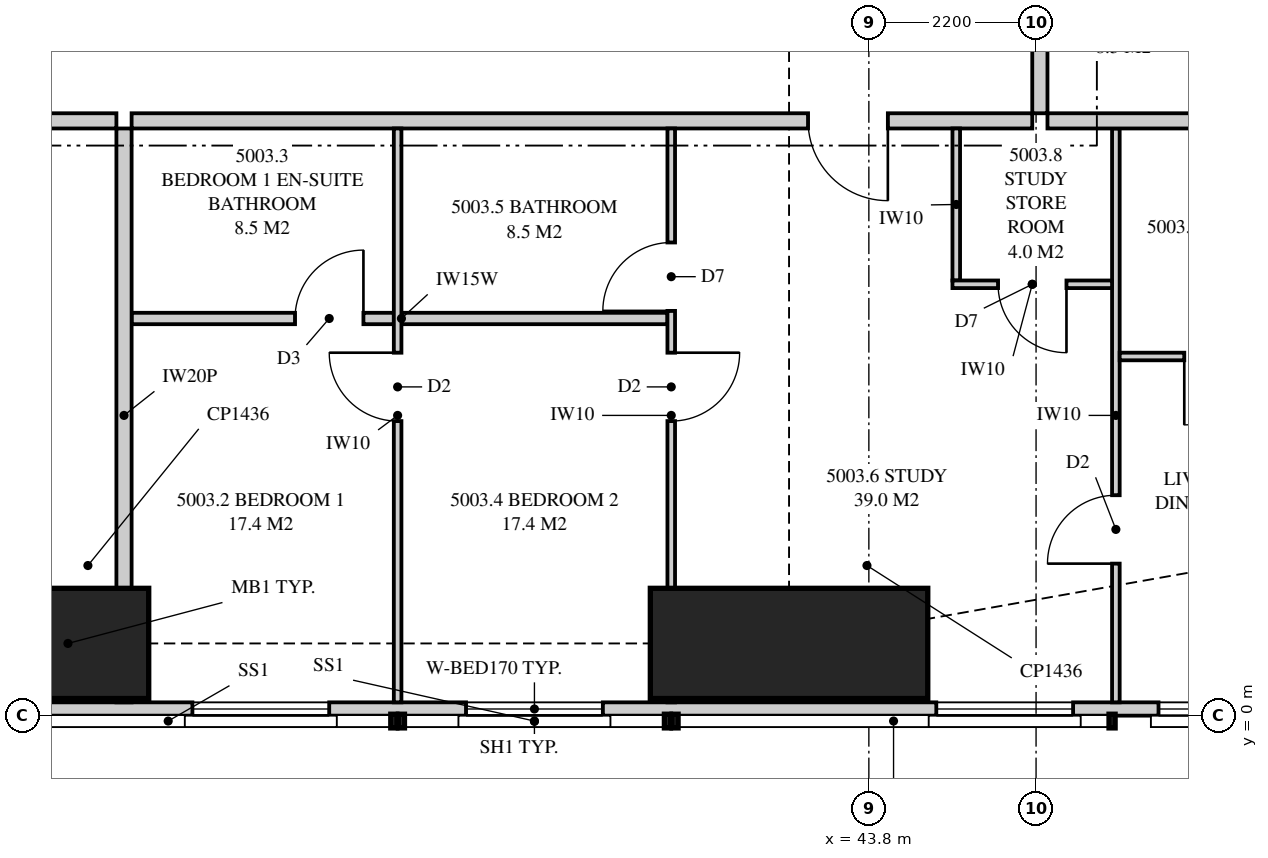
"""IFC4 building model, lengths in metres.
Left out: names, types, materials, properties, quantities, classifications, styles, units other than length and angle.
Written with IfcOpenShell. Run it as: python <this file> out.ifc"""

import sys

from ifc_helpers import new_model, si_unit, direction, frame, frame_2d, origin, origin_2d, place, context, subcontext, project, spatial, polyline, rectangle, outline, extrude, element, fill, save


model = new_model("IFC4")
c1 = context("Model", 3, precision=1e-05, world=origin(), true_north=direction((0.0, 1.0)))
c2 = subcontext(c1, "Body", "Model", "MODEL_VIEW")
j1 = project(units=[si_unit("LENGTHUNIT", "METRE"), si_unit("PLANEANGLEUNIT", "RADIAN")], contexts=[c1])
p1 = place(None, origin())
s1 = spatial("IfcSite", under=j1, at=p1, CompositionType="ELEMENT")
p2 = place(p1, origin())
s2 = spatial("IfcBuilding", under=s1, at=p2, CompositionType="ELEMENT")
p3 = place(p2, frame((0.0, 0.0, 184.5)))
s3 = spatial("IfcBuildingStorey", under=s2, at=p3, CompositionType="ELEMENT", Elevation=184.5)
for number, where, z_axis, x_axis in (
    (1, (32.5, 0.95, 0.0), (0.0, 0.0, 1.0), (0.0, 1.0, 0.0)),
    (2, (42.75, 0.95, 0.0), (0.0, 0.0, 1.0), (0.0, 1.0, 0.0)),
):
    element("IfcColumn", number, at=place(p3, frame(where, z_axis=z_axis, x_axis=x_axis)), inside=s3, PredefinedType="COLUMN", context=c2, shape_type="SweptSolid", body=[
        extrude(rectangle(XDim=1.45, YDim=3.65, at=origin_2d()), origin(), (0.0, 0.0, 1.0), 3.35),
    ])
p4 = place(p3, frame((15.051, 0.087, 0.0), z_axis=(0.0, 0.0, 1.0), x_axis=(1.0, 0.0, 0.0)))
e3 = element("IfcWall", 3, at=p4, inside=s3, PredefinedType="SOLIDWALL", context=c2, shape_type="SweptSolid", body=[
    extrude(outline(polyline([(0.0, 0.0), (34.897, 0.0), (34.897, 3.11), (27.91, 3.11), (27.91, 2.15), (27.836, 2.15), (27.836, 3.11), (27.699, 3.11), (27.699, 2.15), (7.199, 2.15), (7.199, 3.11), (7.062, 3.11), (7.062, 2.15), (6.987, 2.15), (6.987, 3.11), (0.0, 3.11), (0.0, 0.0)])), frame((0.0, 0.087, 0.0), z_axis=(0.0, -1.0, 0.0), x_axis=(1.0, 0.0, 0.0)), (0.0, 0.0, 1.0), 0.175),
])
p5 = place(p4, frame((2.84, 0.0, 0.4)))
e4 = element("IfcOpeningElement", 4, at=p5, cuts=e3, PredefinedType="OPENING", context=c2, shape_type="SweptSolid", body=[
    extrude(rectangle(XDim=2.4, YDim=1.7, at=frame_2d((1.2, 0.85))), frame((0.0, 0.097, 0.0), z_axis=(0.0, -1.0, 0.0), x_axis=(1.0, 0.0, 0.0)), (0.0, 0.0, 1.0), 0.195),
])
p6 = place(p4, frame((9.149, 0.0, 0.4)))
e5 = element("IfcOpeningElement", 5, at=p6, cuts=e3, PredefinedType="OPENING", context=c2, shape_type="SweptSolid", body=[
    extrude(rectangle(XDim=1.8, YDim=1.7, at=frame_2d((0.9, 0.85))), frame((0.0, 0.097, 0.0), z_axis=(0.0, -1.0, 0.0), x_axis=(1.0, 0.0, 0.0)), (0.0, 0.0, 1.0), 0.195),
])
p7 = place(p4, frame((13.561, 0.0, 0.0)))
e6 = element("IfcOpeningElement", 6, at=p7, cuts=e3, PredefinedType="OPENING", context=c2, shape_type="SweptSolid", body=[
    extrude(rectangle(XDim=1.8, YDim=2.1, at=frame_2d((0.9, 1.05))), frame((0.0, 0.097, 0.0), z_axis=(0.0, -1.0, 0.0), x_axis=(1.0, 0.0, 0.0)), (0.0, 0.0, 1.0), 0.195),
])
p8 = place(p4, frame((19.849, 0.0, 0.4)))
e7 = element("IfcOpeningElement", 7, at=p8, cuts=e3, PredefinedType="OPENING", context=c2, shape_type="SweptSolid", body=[
    extrude(rectangle(XDim=1.8, YDim=1.7, at=frame_2d((0.9, 0.85))), frame((0.0, 0.097, 0.0), z_axis=(0.0, -1.0, 0.0), x_axis=(1.0, 0.0, 0.0)), (0.0, 0.0, 1.0), 0.195),
])
p9 = place(p4, frame((23.449, 0.0, 0.4)))
e8 = element("IfcOpeningElement", 8, at=p9, cuts=e3, PredefinedType="OPENING", context=c2, shape_type="SweptSolid", body=[
    extrude(rectangle(XDim=1.8, YDim=1.7, at=frame_2d((0.9, 0.85))), frame((0.0, 0.097, 0.0), z_axis=(0.0, -1.0, 0.0), x_axis=(1.0, 0.0, 0.0)), (0.0, 0.0, 1.0), 0.195),
])
p10 = place(p4, frame((29.636, 0.0, 0.4)))
e9 = element("IfcOpeningElement", 9, at=p10, cuts=e3, PredefinedType="OPENING", context=c2, shape_type="SweptSolid", body=[
    extrude(rectangle(XDim=1.8, YDim=1.7, at=frame_2d((0.9, 0.85))), frame((0.0, 0.097, 0.0), z_axis=(0.0, -1.0, 0.0), x_axis=(1.0, 0.0, 0.0)), (0.0, 0.0, 1.0), 0.195),
])
p11 = place(p4, frame((32.56, 0.0, 0.4)))
e10 = element("IfcOpeningElement", 10, at=p11, cuts=e3, PredefinedType="OPENING", context=c2, shape_type="SweptSolid", body=[
    extrude(rectangle(XDim=1.8, YDim=1.7, at=frame_2d((0.9, 0.85))), frame((0.0, 0.097, 0.0), z_axis=(0.0, -1.0, 0.0), x_axis=(1.0, 0.0, 0.0)), (0.0, 0.0, 1.0), 0.195),
])
p12 = place(p3, frame((34.0, 0.175, 0.0), z_axis=(0.0, 0.0, 1.0), x_axis=(0.0, 1.0, 0.0)))
e11 = element("IfcWall", 11, at=p12, inside=s3, PredefinedType="PARTITIONING", context=c2, shape_type="SweptSolid", body=[
    extrude(outline(polyline([(0.0, 0.0), (7.55, 0.0), (7.55, 3.11), (1.685, 3.11), (1.685, 2.15), (0.0, 2.15), (0.0, 3.11), (0.0, 0.0)])), frame((0.0, 0.1, 0.0), z_axis=(0.0, -1.0, 0.0), x_axis=(1.0, 0.0, 0.0)), (0.0, 0.0, 1.0), 0.2),
])
p13 = place(p3, frame((34.1, 7.825, 0.0), z_axis=(0.0, 0.0, 1.0), x_axis=(1.0, 0.0, 0.0)))
e12 = element("IfcWall", 12, at=p13, inside=s3, PredefinedType="PARTITIONING", context=c2, shape_type="SweptSolid", body=[
    extrude(outline(polyline([(0.0, 0.0), (11.85, 0.0), (11.85, 3.11), (8.987, 3.11), (8.987, 2.541), (8.312, 2.541), (8.312, 3.11), (0.0, 3.11), (0.0, 0.0)])), frame((0.0, 0.1, 0.0), z_axis=(0.0, -1.0, 0.0), x_axis=(1.0, 0.0, 0.0)), (0.0, 0.0, 1.0), 0.2),
])
p14 = place(p13, frame((8.9, 0.0, 0.0)))
e13 = element("IfcOpeningElement", 13, at=p14, cuts=e12, PredefinedType="OPENING", context=c2, shape_type="SweptSolid", body=[
    extrude(rectangle(XDim=1.05, YDim=2.2, at=frame_2d((0.525, 1.1))), frame((0.0, 0.11, 0.0), z_axis=(0.0, -1.0, 0.0), x_axis=(1.0, 0.0, 0.0)), (0.0, 0.0, 1.0), 0.22),
])
p15 = place(p3, frame((37.6, 0.175, 0.0), z_axis=(0.0, 0.0, 1.0), x_axis=(0.0, 1.0, 0.0)))
e14 = element("IfcWall", 14, at=p15, inside=s3, PredefinedType="PARTITIONING", context=c2, shape_type="SweptSolid", body=[
    extrude(outline(polyline([(0.0, 0.0), (7.55, 0.0), (7.55, 3.11), (1.635, 3.11), (1.635, 2.15), (0.0, 2.15), (0.0, 3.11), (0.0, 0.0)])), frame((0.0, 0.05, 0.0), z_axis=(0.0, -1.0, 0.0), x_axis=(1.0, 0.0, 0.0)), (0.0, 0.0, 1.0), 0.1),
])
p16 = place(p15, frame((3.7, 0.0, 0.0)))
e15 = element("IfcOpeningElement", 15, at=p16, cuts=e14, PredefinedType="OPENING", context=c2, shape_type="SweptSolid", body=[
    extrude(rectangle(XDim=0.9, YDim=2.1, at=frame_2d((0.45, 1.05))), frame((0.0, 0.06, 0.0), z_axis=(0.0, -1.0, 0.0), x_axis=(1.0, 0.0, 0.0)), (0.0, 0.0, 1.0), 0.12),
])
p17 = place(p3, frame((41.2, 0.175, 0.0), z_axis=(0.0, 0.0, 1.0), x_axis=(0.0, 1.0, 0.0)))
e16 = element("IfcWall", 16, at=p17, inside=s3, PredefinedType="PARTITIONING", context=c2, shape_type="SweptSolid", body=[
    extrude(outline(polyline([(0.0, 0.0), (7.55, 0.0), (7.55, 3.11), (1.635, 3.11), (1.635, 2.15), (0.0, 2.15), (0.0, 3.11), (0.0, 0.0)])), frame((0.0, 0.05, 0.0), z_axis=(0.0, -1.0, 0.0), x_axis=(1.0, 0.0, 0.0)), (0.0, 0.0, 1.0), 0.1),
])
p18 = place(p17, frame((3.7, 0.0, 0.0)))
e17 = element("IfcOpeningElement", 17, at=p18, cuts=e16, PredefinedType="OPENING", context=c2, shape_type="SweptSolid", body=[
    extrude(rectangle(XDim=0.9, YDim=2.1, at=frame_2d((0.45, 1.05))), frame((0.0, 0.06, 0.0), z_axis=(0.0, -1.0, 0.0), x_axis=(1.0, 0.0, 0.0)), (0.0, 0.0, 1.0), 0.12),
])
p19 = place(p17, frame((5.15, 0.0, 0.0)))
e18 = element("IfcOpeningElement", 18, at=p19, cuts=e16, PredefinedType="OPENING", context=c2, shape_type="SweptSolid", body=[
    extrude(rectangle(XDim=0.9, YDim=2.1, at=frame_2d((0.45, 1.05))), frame((0.0, 0.06, 0.0), z_axis=(0.0, -1.0, 0.0), x_axis=(1.0, 0.0, 0.0)), (0.0, 0.0, 1.0), 0.12),
])
p20 = place(p3, frame((34.1, 5.225, 0.0), z_axis=(0.0, 0.0, 1.0), x_axis=(1.0, 0.0, 0.0)))
e19 = element("IfcWall", 19, at=p20, inside=s3, PredefinedType="PLUMBINGWALL", context=c2, shape_type="SweptSolid", body=[
    extrude(rectangle(XDim=3.45, YDim=0.15, at=frame_2d((1.725, 0.0))), origin(), (0.0, 0.0, 1.0), 3.11),
])
p21 = place(p20, frame((2.15, 0.0, 0.0)))
e20 = element("IfcOpeningElement", 20, at=p21, cuts=e19, PredefinedType="OPENING", context=c2, shape_type="SweptSolid", body=[
    extrude(rectangle(XDim=0.9, YDim=2.1, at=frame_2d((0.45, 1.05))), frame((0.0, 0.085, 0.0), z_axis=(0.0, -1.0, 0.0), x_axis=(1.0, 0.0, 0.0)), (0.0, 0.0, 1.0), 0.17),
])
p22 = place(p3, frame((37.65, 5.225, 0.0), z_axis=(0.0, 0.0, 1.0), x_axis=(1.0, 0.0, 0.0)))
e21 = element("IfcWall", 21, at=p22, inside=s3, PredefinedType="PLUMBINGWALL", context=c2, shape_type="SweptSolid", body=[
    extrude(rectangle(XDim=3.5, YDim=0.15, at=frame_2d((1.75, 0.0))), origin(), (0.0, 0.0, 1.0), 3.11),
])
p23 = place(p3, frame((47.05, 0.175, 0.0), z_axis=(0.0, 0.0, 1.0), x_axis=(0.0, 1.0, 0.0)))
e22 = element("IfcWall", 22, at=p23, inside=s3, PredefinedType="PARTITIONING", context=c2, shape_type="SweptSolid", body=[
    extrude(outline(polyline([(0.0, 0.0), (7.55, 0.0), (7.55, 3.11), (2.409, 3.11), (2.409, 2.15), (0.663, 2.15), (0.663, 3.11), (0.0, 3.11), (0.0, 0.0)])), frame((0.0, 0.05, 0.0), z_axis=(0.0, -1.0, 0.0), x_axis=(1.0, 0.0, 0.0)), (0.0, 0.0, 1.0), 0.1),
])
p24 = place(p23, frame((1.825, 0.0, 0.0)))
e23 = element("IfcOpeningElement", 23, at=p24, cuts=e22, PredefinedType="OPENING", context=c2, shape_type="SweptSolid", body=[
    extrude(rectangle(XDim=0.9, YDim=2.1, at=frame_2d((0.45, 1.05))), frame((0.0, 0.06, 0.0), z_axis=(0.0, -1.0, 0.0), x_axis=(1.0, 0.0, 0.0)), (0.0, 0.0, 1.0), 0.12),
])
p25 = place(p3, frame((47.1, 4.725, 0.0), z_axis=(0.0, 0.0, 1.0), x_axis=(1.0, 0.0, 0.0)))
e24 = element("IfcWall", 24, at=p25, inside=s3, PredefinedType="PARTITIONING", context=c2, shape_type="SweptSolid", body=[
    extrude(rectangle(XDim=2.6, YDim=0.1, at=frame_2d((1.3, 0.0))), origin(), (0.0, 0.0, 1.0), 3.11),
])
p26 = place(p25, frame((0.85, 0.0, 0.0)))
e25 = element("IfcOpeningElement", 25, at=p26, cuts=e24, PredefinedType="OPENING", context=c2, shape_type="SweptSolid", body=[
    extrude(rectangle(XDim=0.9, YDim=2.1, at=frame_2d((0.45, 1.05))), frame((0.0, 0.06, 0.0), z_axis=(0.0, -1.0, 0.0), x_axis=(1.0, 0.0, 0.0)), (0.0, 0.0, 1.0), 0.12),
])
p27 = place(p3, frame((46.15, 7.825, 0.0), z_axis=(0.0, 0.0, 1.0), x_axis=(1.0, 0.0, 0.0)))
e26 = element("IfcWall", 26, at=p27, inside=s3, PredefinedType="PARTITIONING", context=c2, shape_type="SweptSolid", body=[
    extrude(outline(polyline([(0.0, 0.0), (6.85, 0.0), (6.85, 3.11), (6.138, 3.11), (6.138, 2.15), (4.303, 2.15), (4.303, 3.11), (0.0, 3.11), (0.0, 0.0)])), frame((0.0, 0.1, 0.0), z_axis=(0.0, -1.0, 0.0), x_axis=(1.0, 0.0, 0.0)), (0.0, 0.0, 1.0), 0.2),
])
p28 = place(p3, frame((46.05, 7.925, 0.0), z_axis=(0.0, 0.0, 1.0), x_axis=(0.0, 1.0, 0.0)))
e27 = element("IfcWall", 27, at=p28, inside=s3, PredefinedType="PARTITIONING", context=c2, shape_type="SweptSolid", body=[
    extrude(outline(polyline([(0.0, 0.0), (13.775, 0.0), (13.775, 3.11), (5.412, 3.11), (5.412, 2.541), (4.738, 2.541), (4.738, 3.11), (0.0, 3.11), (0.0, 0.0)])), frame((0.0, 0.1, 0.0), z_axis=(0.0, -1.0, 0.0), x_axis=(1.0, 0.0, 0.0)), (0.0, 0.0, 1.0), 0.2),
])
p29 = place(p28, frame((6.387, 0.0, 0.0)))
e28 = element("IfcOpeningElement", 28, at=p29, cuts=e27, PredefinedType="OPENING", context=c2, shape_type="SweptSolid", body=[
    extrude(rectangle(XDim=1.05, YDim=2.2, at=frame_2d((0.525, 1.1))), frame((0.0, 0.11, 0.0), z_axis=(0.0, -1.0, 0.0), x_axis=(1.0, 0.0, 0.0)), (0.0, 0.0, 1.0), 0.22),
])
p30 = place(p3, frame((30.05, 7.825, 0.0), z_axis=(0.0, 0.0, 1.0), x_axis=(1.0, 0.0, 0.0)))
e29 = element("IfcWall", 29, at=p30, inside=s3, PredefinedType="PARTITIONING", context=c2, shape_type="SweptSolid", body=[
    extrude(outline(polyline([(0.0, 0.0), (3.85, 0.0), (3.85, 3.11), (2.787, 3.11), (2.787, 2.541), (2.113, 2.541), (2.113, 3.11), (0.0, 3.11), (0.0, 0.0)])), frame((0.0, 0.1, 0.0), z_axis=(0.0, -1.0, 0.0), x_axis=(1.0, 0.0, 0.0)), (0.0, 0.0, 1.0), 0.2),
])
p31 = place(p3, frame((47.0, 5.675, 0.0), z_axis=(0.0, 0.0, 1.0), x_axis=(-1.0, 0.0, 0.0)))
e30 = element("IfcWall", 30, at=p31, inside=s3, PredefinedType="PARTITIONING", context=c2, shape_type="SweptSolid", body=[
    extrude(rectangle(XDim=2.1, YDim=0.1, at=frame_2d((1.05, 0.0))), origin(), (0.0, 0.0, 1.0), 3.11),
])
p32 = place(p31, frame((0.6, 0.0, 0.0)))
e31 = element("IfcOpeningElement", 31, at=p32, cuts=e30, PredefinedType="OPENING", context=c2, shape_type="SweptSolid", body=[
    extrude(rectangle(XDim=0.9, YDim=2.1, at=frame_2d((0.45, 1.05))), frame((0.0, 0.06, 0.0), z_axis=(0.0, -1.0, 0.0), x_axis=(1.0, 0.0, 0.0)), (0.0, 0.0, 1.0), 0.12),
])
p33 = place(p3, frame((44.95, 7.725, 0.0), z_axis=(0.0, 0.0, 1.0), x_axis=(0.0, -1.0, 0.0)))
e32 = element("IfcWall", 32, at=p33, inside=s3, PredefinedType="PARTITIONING", context=c2, shape_type="SweptSolid", body=[
    extrude(rectangle(XDim=2.0, YDim=0.1, at=frame_2d((1.0, 0.0))), origin(), (0.0, 0.0, 1.0), 3.11),
])
p34 = place(p8, origin())
e33 = element("IfcWindow", 33, at=p34, inside=s3, PartitioningType="SINGLE_PANEL", PredefinedType="WINDOW", context=c2, shape_type="SweptSolid", body=[
    extrude(rectangle(XDim=1.8, YDim=1.7, at=frame_2d((0.9, 0.85))), frame((0.0, 0.03, 0.0), z_axis=(0.0, -1.0, 0.0), x_axis=(1.0, 0.0, 0.0)), (0.0, 0.0, 1.0), 0.06),
])
fill(e7, e33)
p35 = place(p9, origin())
e34 = element("IfcWindow", 34, at=p35, inside=s3, PartitioningType="SINGLE_PANEL", PredefinedType="WINDOW", context=c2, shape_type="SweptSolid", body=[
    extrude(rectangle(XDim=1.8, YDim=1.7, at=frame_2d((0.9, 0.85))), frame((0.0, 0.03, 0.0), z_axis=(0.0, -1.0, 0.0), x_axis=(1.0, 0.0, 0.0)), (0.0, 0.0, 1.0), 0.06),
])
fill(e8, e34)
p36 = place(p10, origin())
e35 = element("IfcWindow", 35, at=p36, inside=s3, PartitioningType="SINGLE_PANEL", PredefinedType="WINDOW", context=c2, shape_type="SweptSolid", body=[
    extrude(rectangle(XDim=1.8, YDim=1.7, at=frame_2d((0.9, 0.85))), frame((0.0, 0.03, 0.0), z_axis=(0.0, -1.0, 0.0), x_axis=(1.0, 0.0, 0.0)), (0.0, 0.0, 1.0), 0.06),
])
fill(e9, e35)
p37 = place(p11, origin())
e36 = element("IfcWindow", 36, at=p37, inside=s3, PartitioningType="SINGLE_PANEL", PredefinedType="WINDOW", context=c2, shape_type="SweptSolid", body=[
    extrude(rectangle(XDim=1.8, YDim=1.7, at=frame_2d((0.9, 0.85))), frame((0.0, 0.03, 0.0), z_axis=(0.0, -1.0, 0.0), x_axis=(1.0, 0.0, 0.0)), (0.0, 0.0, 1.0), 0.06),
])
fill(e10, e36)
p38 = place(p14, frame((1.05, 0.0, 0.0), z_axis=(0.0, 0.0, 1.0), x_axis=(-1.0, 0.0, 0.0)))
e37 = element("IfcDoor", 37, at=p38, inside=s3, OperationType="SINGLE_SWING_LEFT", PredefinedType="DOOR", context=c2, shape_type="SweptSolid", body=[
    extrude(rectangle(XDim=1.05, YDim=2.2, at=frame_2d((0.525, 1.1))), frame((0.0, 0.025, 0.0), z_axis=(0.0, -1.0, 0.0), x_axis=(1.0, 0.0, 0.0)), (0.0, 0.0, 1.0), 0.05),
])
fill(e13, e37)
p39 = place(p16, origin())
e38 = element("IfcDoor", 38, at=p39, inside=s3, OperationType="SINGLE_SWING_RIGHT", PredefinedType="DOOR", context=c2, shape_type="SweptSolid", body=[
    extrude(rectangle(XDim=0.9, YDim=2.1, at=frame_2d((0.45, 1.05))), frame((0.0, 0.025, 0.0), z_axis=(0.0, -1.0, 0.0), x_axis=(1.0, 0.0, 0.0)), (0.0, 0.0, 1.0), 0.05),
])
fill(e15, e38)
p40 = place(p21, origin())
e39 = element("IfcDoor", 39, at=p40, inside=s3, OperationType="SINGLE_SWING_RIGHT", PredefinedType="DOOR", context=c2, shape_type="SweptSolid", body=[
    extrude(rectangle(XDim=0.9, YDim=2.1, at=frame_2d((0.45, 1.05))), frame((0.0, 0.025, 0.0), z_axis=(0.0, -1.0, 0.0), x_axis=(1.0, 0.0, 0.0)), (0.0, 0.0, 1.0), 0.05),
])
fill(e20, e39)
p41 = place(p18, frame((0.9, 0.0, 0.0), z_axis=(0.0, 0.0, 1.0), x_axis=(-1.0, 0.0, 0.0)))
e40 = element("IfcDoor", 40, at=p41, inside=s3, OperationType="SINGLE_SWING_LEFT", PredefinedType="DOOR", context=c2, shape_type="SweptSolid", body=[
    extrude(rectangle(XDim=0.9, YDim=2.1, at=frame_2d((0.45, 1.05))), frame((0.0, 0.025, 0.0), z_axis=(0.0, -1.0, 0.0), x_axis=(1.0, 0.0, 0.0)), (0.0, 0.0, 1.0), 0.05),
])
fill(e17, e40)
p42 = place(p19, origin())
e41 = element("IfcDoor", 41, at=p42, inside=s3, OperationType="SINGLE_SWING_LEFT", PredefinedType="DOOR", context=c2, shape_type="SweptSolid", body=[
    extrude(rectangle(XDim=0.9, YDim=2.1, at=frame_2d((0.45, 1.05))), frame((0.0, 0.025, 0.0), z_axis=(0.0, -1.0, 0.0), x_axis=(1.0, 0.0, 0.0)), (0.0, 0.0, 1.0), 0.05),
])
fill(e18, e41)
p43 = place(p24, origin())
e42 = element("IfcDoor", 42, at=p43, inside=s3, OperationType="SINGLE_SWING_LEFT", PredefinedType="DOOR", context=c2, shape_type="SweptSolid", body=[
    extrude(rectangle(XDim=0.9, YDim=2.1, at=frame_2d((0.45, 1.05))), frame((0.0, 0.025, 0.0), z_axis=(0.0, -1.0, 0.0), x_axis=(1.0, 0.0, 0.0)), (0.0, 0.0, 1.0), 0.05),
])
fill(e23, e42)
p44 = place(p26, frame((0.9, 0.0, 0.0), z_axis=(0.0, 0.0, 1.0), x_axis=(-1.0, 0.0, 0.0)))
e43 = element("IfcDoor", 43, at=p44, inside=s3, OperationType="SINGLE_SWING_RIGHT", PredefinedType="DOOR", context=c2, shape_type="SweptSolid", body=[
    extrude(rectangle(XDim=0.9, YDim=2.1, at=frame_2d((0.45, 1.05))), frame((0.0, 0.025, 0.0), z_axis=(0.0, -1.0, 0.0), x_axis=(1.0, 0.0, 0.0)), (0.0, 0.0, 1.0), 0.05),
])
fill(e25, e43)
p45 = place(p32, origin())
e44 = element("IfcDoor", 44, at=p45, inside=s3, OperationType="SINGLE_SWING_LEFT", PredefinedType="DOOR", context=c2, shape_type="SweptSolid", body=[
    extrude(rectangle(XDim=0.9, YDim=2.1, at=frame_2d((0.45, 1.05))), frame((0.0, 0.025, 0.0), z_axis=(0.0, -1.0, 0.0), x_axis=(1.0, 0.0, 0.0)), (0.0, 0.0, 1.0), 0.05),
])
fill(e31, e44)
save(model, sys.argv[1])
